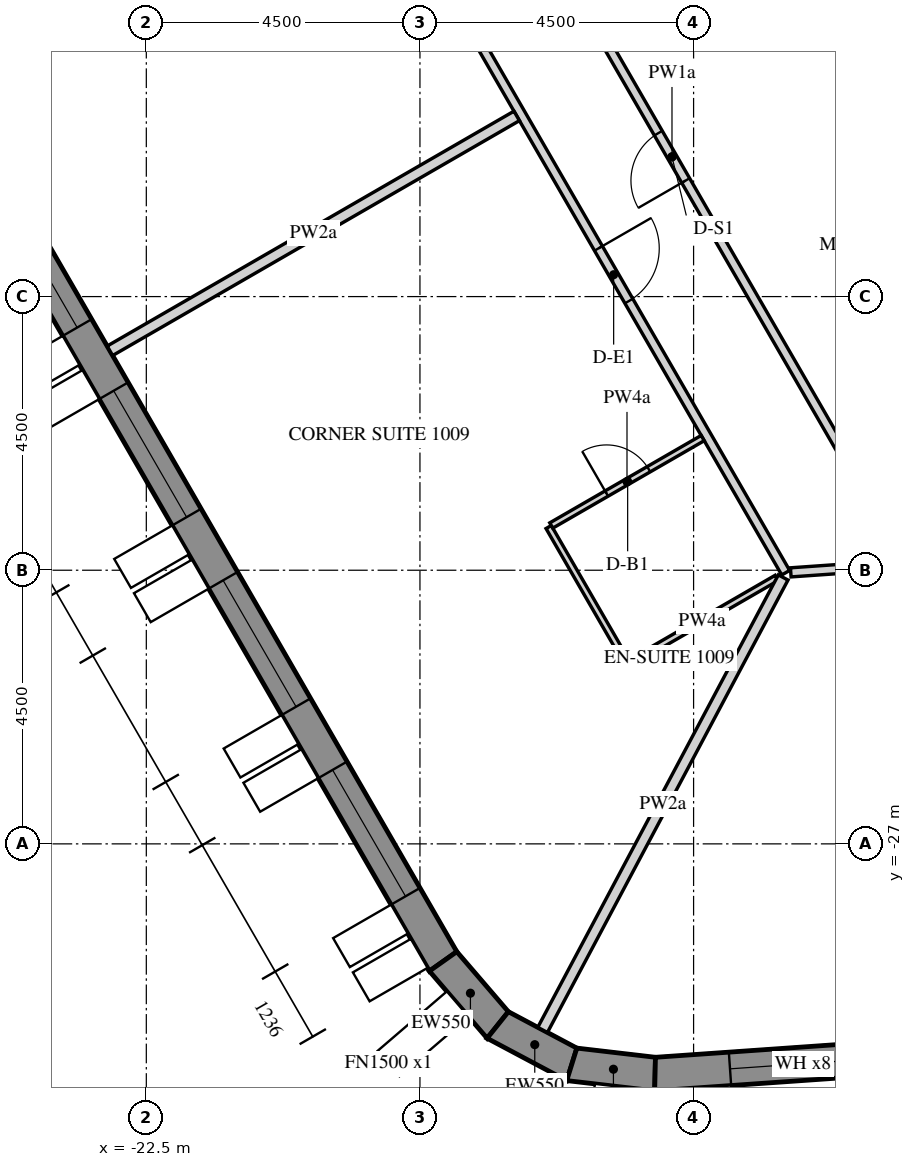
"""IFC4 building model, lengths in metres.
Left out: names, types, materials, properties, quantities, classifications, styles, units other than length and angle.
Written with IfcOpenShell. Run it as: python <this file> out.ifc"""

import sys

from ifc_helpers import new_model, si_unit, direction, frame, frame_2d, origin, place, context, subcontext, project, spatial, polyline, rectangle, outline, extrude, element, fill, save


model = new_model("IFC4")
c1 = context("Model", 3, precision=1e-05, world=origin(), true_north=direction((0.0, 1.0)))
c2 = subcontext(c1, "Body", "Model", "MODEL_VIEW")
j1 = project(units=[si_unit("LENGTHUNIT", "METRE"), si_unit("PLANEANGLEUNIT", "RADIAN")], contexts=[c1])
p1 = place(None, origin())
s1 = spatial("IfcSite", under=j1, at=p1, CompositionType="ELEMENT")
p2 = place(p1, origin())
s2 = spatial("IfcBuilding", under=s1, at=p2, CompositionType="ELEMENT")
p3 = place(p2, frame((0.0, 0.0, 135.0)))
s3 = spatial("IfcBuildingStorey", under=s2, at=p3, CompositionType="ELEMENT", Elevation=135.0)
p4 = place(p3, frame((-32.655, -2.89, -0.15), z_axis=(0.0, 0.0, 1.0), x_axis=(0.499997711317, -0.866026725152, 0.0)))
e1 = element("IfcWall", 1, at=p4, inside=s3, PredefinedType="SOLIDWALL", context=c2, shape_type="SweptSolid", body=[
    extrude(outline(polyline([(-0.022, -0.275), (30.097, -0.275), (30.045, 0.275), (0.022, 0.275), (-0.022, -0.275)])), origin(), (0.0, 0.0, 1.0), 3.9),
])
p5 = place(p4, frame((1.236, 0.0, 1.05)))
e2 = element("IfcOpeningElement", 2, at=p5, cuts=e1, PredefinedType="OPENING", context=c2, shape_type="SweptSolid", body=[
    extrude(rectangle(XDim=2.4, YDim=2.4, at=frame_2d((1.2, 1.2))), frame((0.0, 0.285, 0.0), z_axis=(0.0, -1.0, 0.0), x_axis=(1.0, 0.0, 0.0)), (0.0, 0.0, 1.0), 0.57),
])
p6 = place(p4, frame((4.835, 0.0, 1.05)))
e3 = element("IfcOpeningElement", 3, at=p6, cuts=e1, PredefinedType="OPENING", context=c2, shape_type="SweptSolid", body=[
    extrude(rectangle(XDim=2.4, YDim=2.4, at=frame_2d((1.2, 1.2))), frame((0.0, 0.285, 0.0), z_axis=(0.0, -1.0, 0.0), x_axis=(1.0, 0.0, 0.0)), (0.0, 0.0, 1.0), 0.57),
])
p7 = place(p4, frame((8.436, 0.0, 1.05)))
e4 = element("IfcOpeningElement", 4, at=p7, cuts=e1, PredefinedType="OPENING", context=c2, shape_type="SweptSolid", body=[
    extrude(rectangle(XDim=2.4, YDim=2.4, at=frame_2d((1.2, 1.2))), frame((0.0, 0.285, 0.0), z_axis=(0.0, -1.0, 0.0), x_axis=(1.0, 0.0, 0.0)), (0.0, 0.0, 1.0), 0.57),
])
p8 = place(p4, frame((12.035, 0.0, 1.05)))
e5 = element("IfcOpeningElement", 5, at=p8, cuts=e1, PredefinedType="OPENING", context=c2, shape_type="SweptSolid", body=[
    extrude(rectangle(XDim=2.4, YDim=2.4, at=frame_2d((1.2, 1.2))), frame((0.0, 0.285, 0.0), z_axis=(0.0, -1.0, 0.0), x_axis=(1.0, 0.0, 0.0)), (0.0, 0.0, 1.0), 0.57),
])
p9 = place(p4, frame((15.635, 0.0, 1.05)))
e6 = element("IfcOpeningElement", 6, at=p9, cuts=e1, PredefinedType="OPENING", context=c2, shape_type="SweptSolid", body=[
    extrude(rectangle(XDim=2.4, YDim=2.4, at=frame_2d((1.2, 1.2))), frame((0.0, 0.285, 0.0), z_axis=(0.0, -1.0, 0.0), x_axis=(1.0, 0.0, 0.0)), (0.0, 0.0, 1.0), 0.57),
])
p10 = place(p4, frame((19.236, 0.0, 1.05)))
e7 = element("IfcOpeningElement", 7, at=p10, cuts=e1, PredefinedType="OPENING", context=c2, shape_type="SweptSolid", body=[
    extrude(rectangle(XDim=2.4, YDim=2.4, at=frame_2d((1.2, 1.2))), frame((0.0, 0.285, 0.0), z_axis=(0.0, -1.0, 0.0), x_axis=(1.0, 0.0, 0.0)), (0.0, 0.0, 1.0), 0.57),
])
p11 = place(p4, frame((22.835, 0.0, 1.05)))
e8 = element("IfcOpeningElement", 8, at=p11, cuts=e1, PredefinedType="OPENING", context=c2, shape_type="SweptSolid", body=[
    extrude(rectangle(XDim=2.4, YDim=2.4, at=frame_2d((1.2, 1.2))), frame((0.0, 0.285, 0.0), z_axis=(0.0, -1.0, 0.0), x_axis=(1.0, 0.0, 0.0)), (0.0, 0.0, 1.0), 0.57),
])
p12 = place(p4, frame((26.436, 0.0, 1.05)))
e9 = element("IfcOpeningElement", 9, at=p12, cuts=e1, PredefinedType="OPENING", context=c2, shape_type="SweptSolid", body=[
    extrude(rectangle(XDim=2.4, YDim=2.4, at=frame_2d((1.2, 1.2))), frame((0.0, 0.285, 0.0), z_axis=(0.0, -1.0, 0.0), x_axis=(1.0, 0.0, 0.0)), (0.0, 0.0, 1.0), 0.57),
])
p13 = place(p3, frame((-17.619, -28.932, -0.15), z_axis=(0.0, 0.0, 1.0), x_axis=(0.651621950847, -0.758543890078, 0.0)))
e10 = element("IfcWall", 10, at=p13, inside=s3, PredefinedType="SOLIDWALL", context=c2, shape_type="SweptSolid", body=[
    extrude(outline(polyline([(-0.026, -0.275), (1.431, -0.275), (1.327, 0.275), (0.026, 0.275), (-0.026, -0.275)])), origin(), (0.0, 0.0, 1.0), 3.9),
])
p14 = place(p3, frame((-16.721, -29.979, -0.15), z_axis=(0.0, 0.0, 1.0), x_axis=(0.882994189209, -0.469383917304, 0.0)))
e11 = element("IfcWall", 11, at=p14, inside=s3, PredefinedType="SOLIDWALL", context=c2, shape_type="SweptSolid", body=[
    extrude(outline(polyline([(-0.052, -0.275), (1.431, -0.275), (1.327, 0.275), (0.052, 0.275), (-0.052, -0.275)])), origin(), (0.0, 0.0, 1.0), 3.9),
])
p15 = place(p3, frame((-15.503, -30.626, -0.15), z_axis=(0.0, 0.0, 1.0), x_axis=(0.993232537394, -0.11614269956, 0.0)))
e12 = element("IfcWall", 12, at=p15, inside=s3, PredefinedType="SOLIDWALL", context=c2, shape_type="SweptSolid", body=[
    extrude(outline(polyline([(-0.052, -0.275), (1.405, -0.275), (1.353, 0.275), (0.052, 0.275), (-0.052, -0.275)])), origin(), (0.0, 0.0, 1.0), 3.9),
])
p16 = place(p3, frame((-14.134, -30.786, -0.15), z_axis=(0.0, 0.0, 1.0), x_axis=(0.997564037441, 0.069756657061, 0.0)))
e13 = element("IfcWall", 13, at=p16, inside=s3, PredefinedType="SOLIDWALL", context=c2, shape_type="SweptSolid", body=[
    extrude(outline(polyline([(-0.026, -0.275), (30.094, -0.275), (30.049, 0.275), (0.026, 0.275), (-0.026, -0.275)])), origin(), (0.0, 0.0, 1.0), 3.9),
])
p17 = place(p16, frame((1.236, 0.0, 1.05)))
e14 = element("IfcOpeningElement", 14, at=p17, cuts=e13, PredefinedType="OPENING", context=c2, shape_type="SweptSolid", body=[
    extrude(rectangle(XDim=2.4, YDim=2.4, at=frame_2d((1.2, 1.2))), frame((0.0, 0.285, 0.0), z_axis=(0.0, -1.0, 0.0), x_axis=(1.0, 0.0, 0.0)), (0.0, 0.0, 1.0), 0.57),
])
p18 = place(p16, frame((4.835, 0.0, 1.05)))
e15 = element("IfcOpeningElement", 15, at=p18, cuts=e13, PredefinedType="OPENING", context=c2, shape_type="SweptSolid", body=[
    extrude(rectangle(XDim=2.4, YDim=2.4, at=frame_2d((1.2, 1.2))), frame((0.0, 0.285, 0.0), z_axis=(0.0, -1.0, 0.0), x_axis=(1.0, 0.0, 0.0)), (0.0, 0.0, 1.0), 0.57),
])
p19 = place(p16, frame((8.436, 0.0, 1.05)))
e16 = element("IfcOpeningElement", 16, at=p19, cuts=e13, PredefinedType="OPENING", context=c2, shape_type="SweptSolid", body=[
    extrude(rectangle(XDim=2.4, YDim=2.4, at=frame_2d((1.2, 1.2))), frame((0.0, 0.285, 0.0), z_axis=(0.0, -1.0, 0.0), x_axis=(1.0, 0.0, 0.0)), (0.0, 0.0, 1.0), 0.57),
])
p20 = place(p16, frame((12.035, 0.0, 1.05)))
e17 = element("IfcOpeningElement", 17, at=p20, cuts=e13, PredefinedType="OPENING", context=c2, shape_type="SweptSolid", body=[
    extrude(rectangle(XDim=2.4, YDim=2.4, at=frame_2d((1.2, 1.2))), frame((0.0, 0.285, 0.0), z_axis=(0.0, -1.0, 0.0), x_axis=(1.0, 0.0, 0.0)), (0.0, 0.0, 1.0), 0.57),
])
p21 = place(p16, frame((15.635, 0.0, 1.05)))
e18 = element("IfcOpeningElement", 18, at=p21, cuts=e13, PredefinedType="OPENING", context=c2, shape_type="SweptSolid", body=[
    extrude(rectangle(XDim=2.4, YDim=2.4, at=frame_2d((1.2, 1.2))), frame((0.0, 0.285, 0.0), z_axis=(0.0, -1.0, 0.0), x_axis=(1.0, 0.0, 0.0)), (0.0, 0.0, 1.0), 0.57),
])
p22 = place(p16, frame((19.236, 0.0, 1.05)))
e19 = element("IfcOpeningElement", 19, at=p22, cuts=e13, PredefinedType="OPENING", context=c2, shape_type="SweptSolid", body=[
    extrude(rectangle(XDim=2.4, YDim=2.4, at=frame_2d((1.2, 1.2))), frame((0.0, 0.285, 0.0), z_axis=(0.0, -1.0, 0.0), x_axis=(1.0, 0.0, 0.0)), (0.0, 0.0, 1.0), 0.57),
])
p23 = place(p16, frame((22.835, 0.0, 1.05)))
e20 = element("IfcOpeningElement", 20, at=p23, cuts=e13, PredefinedType="OPENING", context=c2, shape_type="SweptSolid", body=[
    extrude(rectangle(XDim=2.4, YDim=2.4, at=frame_2d((1.2, 1.2))), frame((0.0, 0.285, 0.0), z_axis=(0.0, -1.0, 0.0), x_axis=(1.0, 0.0, 0.0)), (0.0, 0.0, 1.0), 0.57),
])
p24 = place(p16, frame((26.436, 0.0, 1.05)))
e21 = element("IfcOpeningElement", 21, at=p24, cuts=e13, PredefinedType="OPENING", context=c2, shape_type="SweptSolid", body=[
    extrude(rectangle(XDim=2.4, YDim=2.4, at=frame_2d((1.2, 1.2))), frame((0.0, 0.285, 0.0), z_axis=(0.0, -1.0, 0.0), x_axis=(1.0, 0.0, 0.0)), (0.0, 0.0, 1.0), 0.57),
])
p25 = place(p3, frame((-15.819, 0.0, -0.15), z_axis=(0.0, 0.0, 1.0), x_axis=(0.499999880136, -0.866025472988, 0.0)))
e22 = element("IfcWall", 22, at=p25, inside=s3, PredefinedType="SHEAR", context=c2, shape_type="SweptSolid", body=[
    extrude(outline(polyline([(-0.173, -0.3), (15.993, -0.3), (15.646, 0.3), (0.173, 0.3), (-0.173, -0.3)])), origin(), (0.0, 0.0, 1.0), 3.9),
])
p26 = place(p25, frame((6.981, 0.0, 0.15)))
e23 = element("IfcOpeningElement", 23, at=p26, cuts=e22, PredefinedType="OPENING", context=c2, shape_type="SweptSolid", body=[
    extrude(rectangle(XDim=1.8, YDim=2.4, at=frame_2d((0.9, 1.2))), frame((0.0, 0.31, 0.0), z_axis=(0.0, -1.0, 0.0), x_axis=(1.0, 0.0, 0.0)), (0.0, 0.0, 1.0), 0.62),
])
p27 = place(p3, frame((-23.743, -2.175, 0.0), z_axis=(0.0, 0.0, 1.0), x_axis=(0.499992353047, -0.86602981871, 0.0)))
e24 = element("IfcWall", 24, at=p27, inside=s3, PredefinedType="PARTITIONING", context=c2, shape_type="SweptSolid", body=[
    extrude(rectangle(XDim=23.516, YDim=0.15, at=frame_2d((11.758, 0.0))), origin(), (0.0, 0.0, 1.0), 2.838),
])
p28 = place(p27, frame((10.099, 0.0, 0.0)))
e25 = element("IfcOpeningElement", 25, at=p28, cuts=e24, PredefinedType="OPENING", context=c2, shape_type="SweptSolid", body=[
    extrude(rectangle(XDim=1.0, YDim=2.1, at=frame_2d((0.5, 1.05))), frame((0.0, 0.085, 0.0), z_axis=(0.0, -1.0, 0.0), x_axis=(1.0, 0.0, 0.0)), (0.0, 0.0, 1.0), 0.17),
])
p29 = place(p27, frame((17.358, 0.0, 0.0)))
e26 = element("IfcOpeningElement", 26, at=p29, cuts=e24, PredefinedType="OPENING", context=c2, shape_type="SweptSolid", body=[
    extrude(rectangle(XDim=1.0, YDim=2.1, at=frame_2d((0.5, 1.05))), frame((0.0, 0.085, 0.0), z_axis=(0.0, -1.0, 0.0), x_axis=(1.0, 0.0, 0.0)), (0.0, 0.0, 1.0), 0.17),
])
p30 = place(p3, frame((-11.902, -22.535, 0.0), z_axis=(0.0, 0.0, 1.0), x_axis=(0.997563830208, 0.069759620556, 0.0)))
e27 = element("IfcWall", 27, at=p30, inside=s3, PredefinedType="PARTITIONING", context=c2, shape_type="SweptSolid", body=[
    extrude(rectangle(XDim=19.434, YDim=0.15, at=frame_2d((9.717, 0.0))), origin(), (0.0, 0.0, 1.0), 2.838),
])
p31 = place(p30, frame((2.575, 0.0, 0.0)))
e28 = element("IfcOpeningElement", 28, at=p31, cuts=e27, PredefinedType="OPENING", context=c2, shape_type="SweptSolid", body=[
    extrude(rectangle(XDim=1.0, YDim=2.1, at=frame_2d((0.5, 1.05))), frame((0.0, 0.085, 0.0), z_axis=(0.0, -1.0, 0.0), x_axis=(1.0, 0.0, 0.0)), (0.0, 0.0, 1.0), 0.17),
])
p32 = place(p30, frame((12.234, 0.0, 0.0)))
e29 = element("IfcOpeningElement", 29, at=p32, cuts=e27, PredefinedType="OPENING", context=c2, shape_type="SweptSolid", body=[
    extrude(rectangle(XDim=1.0, YDim=2.1, at=frame_2d((0.5, 1.05))), frame((0.0, 0.085, 0.0), z_axis=(0.0, -1.0, 0.0), x_axis=(1.0, 0.0, 0.0)), (0.0, 0.0, 1.0), 0.17),
])
p33 = place(p3, frame((-11.031, -20.595, 0.0), z_axis=(0.0, 0.0, 1.0), x_axis=(-0.499987422378, 0.866032665356, 0.0)))
e30 = element("IfcWall", 30, at=p33, inside=s3, PredefinedType="PARTITIONING", context=c2, shape_type="SweptSolid", body=[
    extrude(rectangle(XDim=11.299, YDim=0.15, at=frame_2d((5.649, 0.0))), origin(), (0.0, 0.0, 1.0), 2.838),
])
p34 = place(p33, frame((5.199, 0.0, 0.0)))
e31 = element("IfcOpeningElement", 31, at=p34, cuts=e30, PredefinedType="OPENING", context=c2, shape_type="SweptSolid", body=[
    extrude(rectangle(XDim=0.9, YDim=2.1, at=frame_2d((0.45, 1.05))), frame((0.0, 0.085, 0.0), z_axis=(0.0, -1.0, 0.0), x_axis=(1.0, 0.0, 0.0)), (0.0, 0.0, 1.0), 0.17),
])
p35 = place(p3, frame((-23.099, -18.892, 0.0), z_axis=(0.0, 0.0, 1.0), x_axis=(0.866019273868, 0.500010617176, 0.0)))
e32 = element("IfcWall", 32, at=p35, inside=s3, PredefinedType="PARTITIONING", context=c2, shape_type="SweptSolid", body=[
    extrude(rectangle(XDim=7.725, YDim=0.18, at=frame_2d((3.862, 0.0))), origin(), (0.0, 0.0, 1.0), 2.838),
])
p36 = place(p3, frame((-12.133, -22.626, 0.0), z_axis=(0.0, 0.0, 1.0), x_axis=(-0.866014564827, -0.500018773155, 0.0)))
e33 = element("IfcWall", 33, at=p36, inside=s3, PredefinedType="PARTITIONING", context=c2, shape_type="SweptSolid", body=[
    extrude(rectangle(XDim=2.829, YDim=0.1, at=frame_2d((1.415, 0.0))), origin(), (0.0, 0.0, 1.0), 2.838),
])
p37 = place(p3, frame((-14.608, -23.998, 0.0), z_axis=(0.0, 0.0, 1.0), x_axis=(-0.499990435942, 0.866030925526, 0.0)))
e34 = element("IfcWall", 34, at=p37, inside=s3, PredefinedType="PARTITIONING", context=c2, shape_type="SweptSolid", body=[
    extrude(rectangle(XDim=2.55, YDim=0.1, at=frame_2d((1.275, 0.0))), origin(), (0.0, 0.0, 1.0), 2.838),
])
p38 = place(p3, frame((-15.84, -21.764, 0.0), z_axis=(0.0, 0.0, 1.0), x_axis=(0.866039941686, 0.499974818771, 0.0)))
e35 = element("IfcWall", 35, at=p38, inside=s3, PredefinedType="PARTITIONING", context=c2, shape_type="SweptSolid", body=[
    extrude(rectangle(XDim=2.875, YDim=0.1, at=frame_2d((1.438, 0.0))), origin(), (0.0, 0.0, 1.0), 2.838),
])
p39 = place(p38, frame((1.05, 0.0, 0.0)))
e36 = element("IfcOpeningElement", 36, at=p39, cuts=e35, PredefinedType="OPENING", context=c2, shape_type="SweptSolid", body=[
    extrude(rectangle(XDim=0.8, YDim=2.1, at=frame_2d((0.4, 1.05))), frame((0.0, 0.06, 0.0), z_axis=(0.0, -1.0, 0.0), x_axis=(1.0, 0.0, 0.0)), (0.0, 0.0, 1.0), 0.12),
])
p40 = place(p3, frame((-15.983, -30.059, 0.0), z_axis=(0.0, 0.0, 1.0), x_axis=(0.469475065364, 0.882945730496, 0.0)))
e37 = element("IfcWall", 37, at=p40, inside=s3, PredefinedType="PARTITIONING", context=c2, shape_type="SweptSolid", body=[
    extrude(rectangle(XDim=8.427, YDim=0.18, at=frame_2d((4.213, 0.0))), origin(), (0.0, 0.0, 1.0), 2.838),
])
p41 = place(p9, frame((0.0, 0.205, 0.0)))
e38 = element("IfcWindow", 38, at=p41, inside=s3, PartitioningType="DOUBLE_PANEL_VERTICAL", PredefinedType="WINDOW", context=c2, shape_type="SweptSolid", body=[
    extrude(rectangle(XDim=2.4, YDim=2.4, at=frame_2d((1.2, 1.2))), frame((0.0, 0.03, 0.0), z_axis=(0.0, -1.0, 0.0), x_axis=(1.0, 0.0, 0.0)), (0.0, 0.0, 1.0), 0.06),
])
fill(e6, e38)
p42 = place(p10, frame((0.0, 0.205, 0.0)))
e39 = element("IfcWindow", 39, at=p42, inside=s3, PartitioningType="DOUBLE_PANEL_VERTICAL", PredefinedType="WINDOW", context=c2, shape_type="SweptSolid", body=[
    extrude(rectangle(XDim=2.4, YDim=2.4, at=frame_2d((1.2, 1.2))), frame((0.0, 0.03, 0.0), z_axis=(0.0, -1.0, 0.0), x_axis=(1.0, 0.0, 0.0)), (0.0, 0.0, 1.0), 0.06),
])
fill(e7, e39)
p43 = place(p11, frame((0.0, 0.205, 0.0)))
e40 = element("IfcWindow", 40, at=p43, inside=s3, PartitioningType="DOUBLE_PANEL_VERTICAL", PredefinedType="WINDOW", context=c2, shape_type="SweptSolid", body=[
    extrude(rectangle(XDim=2.4, YDim=2.4, at=frame_2d((1.2, 1.2))), frame((0.0, 0.03, 0.0), z_axis=(0.0, -1.0, 0.0), x_axis=(1.0, 0.0, 0.0)), (0.0, 0.0, 1.0), 0.06),
])
fill(e8, e40)
p44 = place(p12, frame((0.0, 0.205, 0.0)))
e41 = element("IfcWindow", 41, at=p44, inside=s3, PartitioningType="DOUBLE_PANEL_VERTICAL", PredefinedType="WINDOW", context=c2, shape_type="SweptSolid", body=[
    extrude(rectangle(XDim=2.4, YDim=2.4, at=frame_2d((1.2, 1.2))), frame((0.0, 0.03, 0.0), z_axis=(0.0, -1.0, 0.0), x_axis=(1.0, 0.0, 0.0)), (0.0, 0.0, 1.0), 0.06),
])
fill(e9, e41)
p45 = place(p17, frame((0.0, 0.205, 0.0)))
e42 = element("IfcWindow", 42, at=p45, inside=s3, PartitioningType="DOUBLE_PANEL_VERTICAL", PredefinedType="WINDOW", context=c2, shape_type="SweptSolid", body=[
    extrude(rectangle(XDim=2.4, YDim=2.4, at=frame_2d((1.2, 1.2))), frame((0.0, 0.03, 0.0), z_axis=(0.0, -1.0, 0.0), x_axis=(1.0, 0.0, 0.0)), (0.0, 0.0, 1.0), 0.06),
])
fill(e14, e42)
p46 = place(p29, origin())
e43 = element("IfcDoor", 43, at=p46, inside=s3, OperationType="SINGLE_SWING_RIGHT", PredefinedType="DOOR", context=c2, shape_type="SweptSolid", body=[
    extrude(rectangle(XDim=1.0, YDim=2.1, at=frame_2d((0.5, 1.05))), frame((0.0, 0.025, 0.0), z_axis=(0.0, -1.0, 0.0), x_axis=(1.0, 0.0, 0.0)), (0.0, 0.0, 1.0), 0.05),
])
fill(e26, e43)
p47 = place(p39, origin())
e44 = element("IfcDoor", 44, at=p47, inside=s3, OperationType="SINGLE_SWING_LEFT", PredefinedType="DOOR", context=c2, shape_type="SweptSolid", body=[
    extrude(rectangle(XDim=0.8, YDim=2.1, at=frame_2d((0.4, 1.05))), frame((0.0, 0.025, 0.0), z_axis=(0.0, -1.0, 0.0), x_axis=(1.0, 0.0, 0.0)), (0.0, 0.0, 1.0), 0.05),
])
fill(e36, e44)
p48 = place(p34, origin())
e45 = element("IfcDoor", 45, at=p48, inside=s3, OperationType="SINGLE_SWING_RIGHT", PredefinedType="DOOR", context=c2, shape_type="SweptSolid", body=[
    extrude(rectangle(XDim=0.9, YDim=2.1, at=frame_2d((0.45, 1.05))), frame((0.0, 0.025, 0.0), z_axis=(0.0, -1.0, 0.0), x_axis=(1.0, 0.0, 0.0)), (0.0, 0.0, 1.0), 0.05),
])
fill(e31, e45)
save(model, sys.argv[1])
